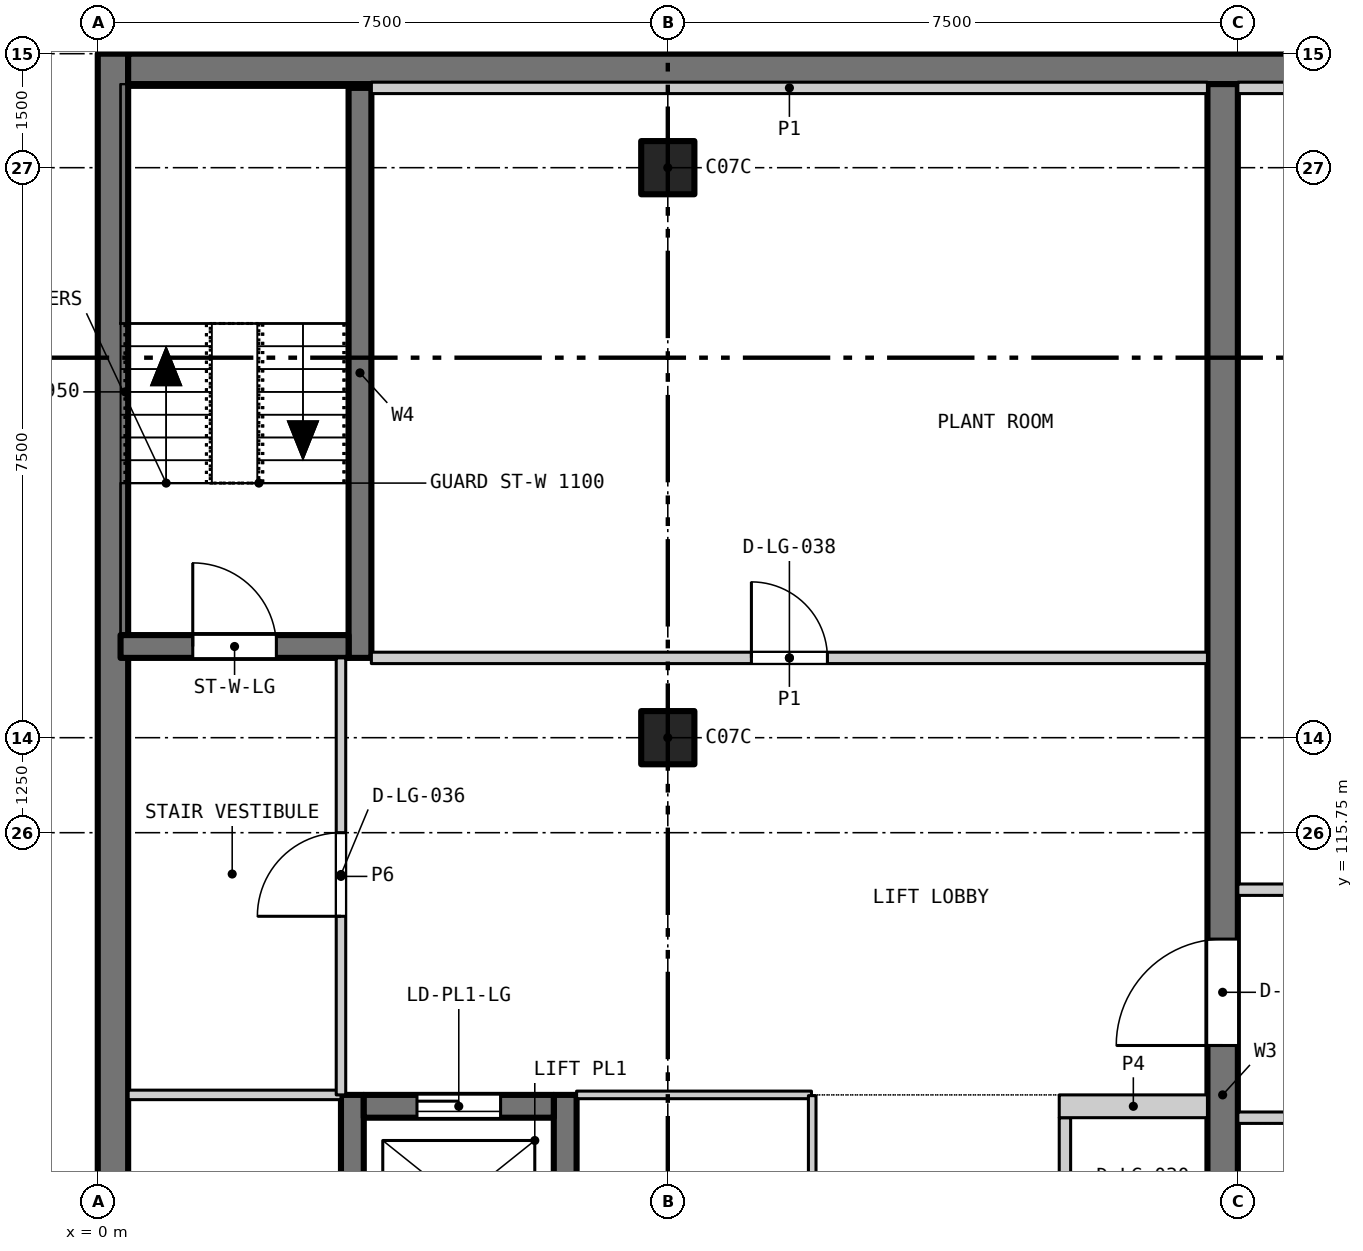
"""IFC4 building model, lengths in metres.
Left out: names, types, materials, properties, quantities, classifications, styles, units other than length and angle.
Written with IfcOpenShell. Run it as: python <this file> out.ifc"""

import sys

from ifc_helpers import new_model, si_unit, direction, frame, frame_2d, origin, origin_2d, place, context, subcontext, project, spatial, rectangle, extrude, element, fill, save


model = new_model("IFC4")
c1 = context("Model", 3, precision=1e-05, world=origin(), true_north=direction((0.0, 1.0)))
c2 = subcontext(c1, "Body", "Model", "MODEL_VIEW")
j1 = project(units=[si_unit("LENGTHUNIT", "METRE"), si_unit("PLANEANGLEUNIT", "RADIAN")], contexts=[c1])
p1 = place(None, origin())
s1 = spatial("IfcSite", under=j1, at=p1, CompositionType="ELEMENT")
p2 = place(p1, origin())
s2 = spatial("IfcBuilding", under=s1, at=p2, CompositionType="ELEMENT")
p3 = place(p2, frame((0.0, 0.0, -5.0)))
s3 = spatial("IfcBuildingStorey", under=s2, at=p3, CompositionType="ELEMENT", Elevation=-5.0)
for number, where, z_axis, x_axis in (
    (1, (7.5, 117.0, 0.0), (0.0, 0.0, 1.0), (1.0, 0.0, 0.0)),
    (2, (7.5, 124.5, 0.0), (0.0, 0.0, 1.0), (1.0, 0.0, 0.0)),
):
    element("IfcColumn", number, at=place(p3, frame(where, z_axis=z_axis, x_axis=x_axis)), inside=s3, PredefinedType="COLUMN", context=c2, shape_type="SweptSolid", body=[
        extrude(rectangle(XDim=0.7, YDim=0.7, at=origin_2d()), origin(), (0.0, 0.0, 1.0), 5.0),
    ])
p4 = place(p3, frame((0.2, 18.0, 0.0), z_axis=(0.0, 0.0, 1.0), x_axis=(0.0, 1.0, 0.0)))
e3 = element("IfcWall", 3, at=p4, inside=s3, PredefinedType="SOLIDWALL", context=c2, shape_type="SweptSolid", body=[
    extrude(rectangle(XDim=108.0, YDim=0.4, at=frame_2d((54.0, 0.0))), origin(), (0.0, 0.0, 1.0), 5.0),
])
p5 = place(p3, frame((0.4, 125.8, 0.0), z_axis=(0.0, 0.0, 1.0), x_axis=(1.0, 0.0, 0.0)))
e4 = element("IfcWall", 4, at=p5, inside=s3, PredefinedType="SOLIDWALL", context=c2, shape_type="SweptSolid", body=[
    extrude(rectangle(XDim=57.2, YDim=0.4, at=frame_2d((28.6, 0.0))), origin(), (0.0, 0.0, 1.0), 5.0),
])
p6 = place(p3, frame((14.8, 99.0, 0.0), z_axis=(0.0, 0.0, 1.0), x_axis=(0.0, 1.0, 0.0)))
e5 = element("IfcWall", 5, at=p6, inside=s3, PredefinedType="SHEAR", context=c2, shape_type="SweptSolid", body=[
    extrude(rectangle(XDim=26.6, YDim=0.4, at=frame_2d((13.3, 0.0))), origin(), (0.0, 0.0, 1.0), 5.0),
])
p7 = place(p6, frame((13.95, 0.0, 0.0)))
e6 = element("IfcOpeningElement", 6, at=p7, cuts=e5, PredefinedType="OPENING", context=c2, shape_type="SweptSolid", body=[
    extrude(rectangle(XDim=1.4, YDim=2.4, at=frame_2d((0.7, 1.2))), frame((0.0, 0.21, 0.0), z_axis=(0.0, -1.0, 0.0), x_axis=(1.0, 0.0, 0.0)), (0.0, 0.0, 1.0), 0.42),
])
p8 = place(p3, frame((3.45, 118.05, 0.0), z_axis=(0.0, 0.0, 1.0), x_axis=(0.0, 1.0, 0.0)))
e7 = element("IfcWall", 7, at=p8, inside=s3, PredefinedType="SHEAR", context=c2, shape_type="SweptSolid", body=[
    extrude(rectangle(XDim=7.5, YDim=0.3, at=frame_2d((3.75, 0.0))), origin(), (0.0, 0.0, 1.0), 5.0),
])
p9 = place(p3, frame((0.3, 118.2, 0.0), z_axis=(0.0, 0.0, 1.0), x_axis=(1.0, 0.0, 0.0)))
e8 = element("IfcWall", 8, at=p9, inside=s3, PredefinedType="SHEAR", context=c2, shape_type="SweptSolid", body=[
    extrude(rectangle(XDim=3.0, YDim=0.3, at=frame_2d((1.5, 0.0))), origin(), (0.0, 0.0, 1.0), 5.0),
])
p10 = place(p9, frame((0.95, 0.0, 0.0)))
e9 = element("IfcOpeningElement", 9, at=p10, cuts=e8, PredefinedType="OPENING", context=c2, shape_type="SweptSolid", body=[
    extrude(rectangle(XDim=1.1, YDim=2.1, at=frame_2d((0.55, 1.05))), frame((0.0, 0.16, 0.0), z_axis=(0.0, -1.0, 0.0), x_axis=(1.0, 0.0, 0.0)), (0.0, 0.0, 1.0), 0.32),
])
for number, where, z_axis, x_axis in (
    (10, (3.35, 109.5, 0.0), (0.0, 0.0, 1.0), (0.0, 1.0, 0.0)),
    (11, (6.15, 109.5, 0.0), (0.0, 0.0, 1.0), (0.0, 1.0, 0.0)),
):
    element("IfcWall", number, at=place(p3, frame(where, z_axis=z_axis, x_axis=x_axis)), inside=s3, PredefinedType="SHEAR", context=c2, shape_type="SweptSolid", body=[
        extrude(rectangle(XDim=2.8, YDim=0.3, at=frame_2d((1.4, 0.0))), origin(), (0.0, 0.0, 1.0), 5.0),
    ])
p11 = place(p3, frame((3.5, 112.15, 0.0), z_axis=(0.0, 0.0, 1.0), x_axis=(1.0, 0.0, 0.0)))
e12 = element("IfcWall", 12, at=p11, inside=s3, PredefinedType="SHEAR", context=c2, shape_type="SweptSolid", body=[
    extrude(rectangle(XDim=2.5, YDim=0.3, at=frame_2d((1.25, 0.0))), origin(), (0.0, 0.0, 1.0), 5.0),
])
p12 = place(p11, frame((0.7, 0.0, 0.0)))
e13 = element("IfcOpeningElement", 13, at=p12, cuts=e12, PredefinedType="OPENING", context=c2, shape_type="SweptSolid", body=[
    extrude(rectangle(XDim=1.1, YDim=2.1, at=frame_2d((0.55, 1.05))), frame((0.0, 0.16, 0.0), z_axis=(0.0, -1.0, 0.0), x_axis=(1.0, 0.0, 0.0)), (0.0, 0.0, 1.0), 0.32),
])
p13 = place(p3, frame((12.725, 108.4, 0.0), z_axis=(0.0, 0.0, 1.0), x_axis=(0.0, 1.0, 0.0)))
e14 = element("IfcWall", 14, at=p13, inside=s3, PredefinedType="PARTITIONING", context=c2, shape_type="SweptSolid", body=[
    extrude(rectangle(XDim=3.6, YDim=0.15, at=frame_2d((1.8, 0.0))), origin(), (0.0, 0.0, 1.0), 4.7),
])
p14 = place(p13, frame((1.35, 0.0, 0.0)))
e15 = element("IfcOpeningElement", 15, at=p14, cuts=e14, PredefinedType="OPENING", context=c2, shape_type="SweptSolid", body=[
    extrude(rectangle(XDim=0.9, YDim=2.1, at=frame_2d((0.45, 1.05))), frame((0.0, 0.085, 0.0), z_axis=(0.0, -1.0, 0.0), x_axis=(1.0, 0.0, 0.0)), (0.0, 0.0, 1.0), 0.17),
])
p15 = place(p3, frame((12.65, 112.15, 0.0), z_axis=(0.0, 0.0, 1.0), x_axis=(1.0, 0.0, 0.0)))
e16 = element("IfcWall", 16, at=p15, inside=s3, PredefinedType="PARTITIONING", context=c2, shape_type="SweptSolid", body=[
    extrude(rectangle(XDim=1.95, YDim=0.3, at=frame_2d((0.975, 0.0))), origin(), (0.0, 0.0, 1.0), 4.7),
])
p16 = place(p3, frame((15.0, 112.0, 0.0), z_axis=(0.0, 0.0, 1.0), x_axis=(1.0, 0.0, 0.0)))
e17 = element("IfcWall", 17, at=p16, inside=s3, PredefinedType="PARTITIONING", context=c2, shape_type="SweptSolid", body=[
    extrude(rectangle(XDim=14.99, YDim=0.15, at=frame_2d((7.495, 0.0))), origin(), (0.0, 0.0, 1.0), 4.7),
])
p17 = place(p3, frame((0.4, 112.3, 0.0), z_axis=(0.0, 0.0, 1.0), x_axis=(1.0, 0.0, 0.0)))
e18 = element("IfcWall", 18, at=p17, inside=s3, PredefinedType="PARTITIONING", context=c2, shape_type="SweptSolid", body=[
    extrude(rectangle(XDim=2.8, YDim=0.125, at=frame_2d((1.4, 0.0))), origin(), (0.0, 0.0, 1.0), 4.7),
])
p18 = place(p3, frame((6.3, 112.3, 0.0), z_axis=(0.0, 0.0, 1.0), x_axis=(1.0, 0.0, 0.0)))
e19 = element("IfcWall", 19, at=p18, inside=s3, PredefinedType="PARTITIONING", context=c2, shape_type="SweptSolid", body=[
    extrude(rectangle(XDim=3.09, YDim=0.1, at=frame_2d((1.545, 0.0))), origin(), (0.0, 0.0, 1.0), 4.7),
])
p19 = place(p3, frame((15.0, 115.0, 0.0), z_axis=(0.0, 0.0, 1.0), x_axis=(1.0, 0.0, 0.0)))
e20 = element("IfcWall", 20, at=p19, inside=s3, PredefinedType="PARTITIONING", context=c2, shape_type="SweptSolid", body=[
    extrude(rectangle(XDim=14.0, YDim=0.15, at=frame_2d((7.0, 0.0))), origin(), (0.0, 0.0, 1.0), 4.7),
])
p20 = place(p19, frame((6.0, 0.0, 0.0)))
e21 = element("IfcOpeningElement", 21, at=p20, cuts=e20, PredefinedType="OPENING", context=c2, shape_type="SweptSolid", body=[
    extrude(rectangle(XDim=2.0, YDim=2.4, at=frame_2d((1.0, 1.2))), frame((0.0, 0.085, 0.0), z_axis=(0.0, -1.0, 0.0), x_axis=(1.0, 0.0, 0.0)), (0.0, 0.0, 1.0), 0.17),
])
p21 = place(p3, frame((3.6, 118.05, 0.0), z_axis=(0.0, 0.0, 1.0), x_axis=(1.0, 0.0, 0.0)))
e22 = element("IfcWall", 22, at=p21, inside=s3, PredefinedType="PARTITIONING", context=c2, shape_type="SweptSolid", body=[
    extrude(rectangle(XDim=11.0, YDim=0.15, at=frame_2d((5.5, 0.0))), origin(), (0.0, 0.0, 1.0), 4.7),
])
p22 = place(p21, frame((5.0, 0.0, 0.0)))
e23 = element("IfcOpeningElement", 23, at=p22, cuts=e22, PredefinedType="OPENING", context=c2, shape_type="SweptSolid", body=[
    extrude(rectangle(XDim=1.0, YDim=2.1, at=frame_2d((0.5, 1.05))), frame((0.0, 0.085, 0.0), z_axis=(0.0, -1.0, 0.0), x_axis=(1.0, 0.0, 0.0)), (0.0, 0.0, 1.0), 0.17),
])
p23 = place(p3, frame((3.6, 125.55, 0.0), z_axis=(0.0, 0.0, 1.0), x_axis=(1.0, 0.0, 0.0)))
e24 = element("IfcWall", 24, at=p23, inside=s3, PredefinedType="PARTITIONING", context=c2, shape_type="SweptSolid", body=[
    extrude(rectangle(XDim=11.0, YDim=0.15, at=frame_2d((5.5, 0.0))), origin(), (0.0, 0.0, 1.0), 4.7),
])
p24 = place(p3, frame((15.0, 125.55, 0.0), z_axis=(0.0, 0.0, 1.0), x_axis=(1.0, 0.0, 0.0)))
e25 = element("IfcWall", 25, at=p24, inside=s3, PredefinedType="PARTITIONING", context=c2, shape_type="SweptSolid", body=[
    extrude(rectangle(XDim=14.03, YDim=0.15, at=frame_2d((7.015, 0.0))), origin(), (0.0, 0.0, 1.0), 4.7),
])
p25 = place(p3, frame((3.2, 112.3, 0.0), z_axis=(0.0, 0.0, 1.0), x_axis=(0.0, 1.0, 0.0)))
e26 = element("IfcWall", 26, at=p25, inside=s3, PredefinedType="PARTITIONING", context=c2, shape_type="SweptSolid", body=[
    extrude(rectangle(XDim=5.75, YDim=0.125, at=frame_2d((2.875, 0.0))), origin(), (0.0, 0.0, 1.0), 4.7),
])
p26 = place(p25, frame((2.35, 0.0, 0.0)))
e27 = element("IfcOpeningElement", 27, at=p26, cuts=e26, PredefinedType="OPENING", context=c2, shape_type="SweptSolid", body=[
    extrude(rectangle(XDim=1.1, YDim=2.1, at=frame_2d((0.55, 1.05))), frame((0.0, 0.073, 0.0), z_axis=(0.0, -1.0, 0.0), x_axis=(1.0, 0.0, 0.0)), (0.0, 0.0, 1.0), 0.145),
])
p27 = place(p3, frame((9.4, 108.975, 0.0), z_axis=(0.0, 0.0, 1.0), x_axis=(0.0, 1.0, 0.0)))
e28 = element("IfcWall", 28, at=p27, inside=s3, PredefinedType="PARTITIONING", context=c2, shape_type="SweptSolid", body=[
    extrude(rectangle(XDim=3.315, YDim=0.1, at=frame_2d((1.657, 0.0))), origin(), (0.0, 0.0, 1.0), 4.7),
])
p28 = place(p7, origin())
e29 = element("IfcDoor", 29, at=p28, inside=s3, OperationType="SINGLE_SWING_LEFT", PredefinedType="DOOR", context=c2, shape_type="SweptSolid", body=[
    extrude(rectangle(XDim=1.4, YDim=2.4, at=frame_2d((0.7, 1.2))), frame((0.0, 0.025, 0.0), z_axis=(0.0, -1.0, 0.0), x_axis=(1.0, 0.0, 0.0)), (0.0, 0.0, 1.0), 0.05),
])
fill(e6, e29)
p29 = place(p26, origin())
e30 = element("IfcDoor", 30, at=p29, inside=s3, OperationType="SINGLE_SWING_LEFT", PredefinedType="DOOR", context=c2, shape_type="SweptSolid", body=[
    extrude(rectangle(XDim=1.1, YDim=2.1, at=frame_2d((0.55, 1.05))), frame((0.0, 0.025, 0.0), z_axis=(0.0, -1.0, 0.0), x_axis=(1.0, 0.0, 0.0)), (0.0, 0.0, 1.0), 0.05),
])
fill(e27, e30)
p30 = place(p22, origin())
e31 = element("IfcDoor", 31, at=p30, inside=s3, OperationType="SINGLE_SWING_LEFT", PredefinedType="DOOR", context=c2, shape_type="SweptSolid", body=[
    extrude(rectangle(XDim=1.0, YDim=2.1, at=frame_2d((0.5, 1.05))), frame((0.0, 0.025, 0.0), z_axis=(0.0, -1.0, 0.0), x_axis=(1.0, 0.0, 0.0)), (0.0, 0.0, 1.0), 0.05),
])
fill(e23, e31)
p31 = place(p10, origin())
e32 = element("IfcDoor", 32, at=p31, inside=s3, OperationType="SINGLE_SWING_LEFT", PredefinedType="DOOR", context=c2, shape_type="SweptSolid", body=[
    extrude(rectangle(XDim=1.1, YDim=2.1, at=frame_2d((0.55, 1.05))), frame((0.0, 0.025, 0.0), z_axis=(0.0, -1.0, 0.0), x_axis=(1.0, 0.0, 0.0)), (0.0, 0.0, 1.0), 0.05),
])
fill(e9, e32)
p32 = place(p12, origin())
e33 = element("IfcDoor", 33, at=p32, inside=s3, OperationType="SLIDING_TO_LEFT", PredefinedType="DOOR", context=c2, shape_type="SweptSolid", body=[
    extrude(rectangle(XDim=1.1, YDim=2.1, at=frame_2d((0.55, 1.05))), frame((0.0, 0.025, 0.0), z_axis=(0.0, -1.0, 0.0), x_axis=(1.0, 0.0, 0.0)), (0.0, 0.0, 1.0), 0.05),
])
fill(e13, e33)
save(model, sys.argv[1])
